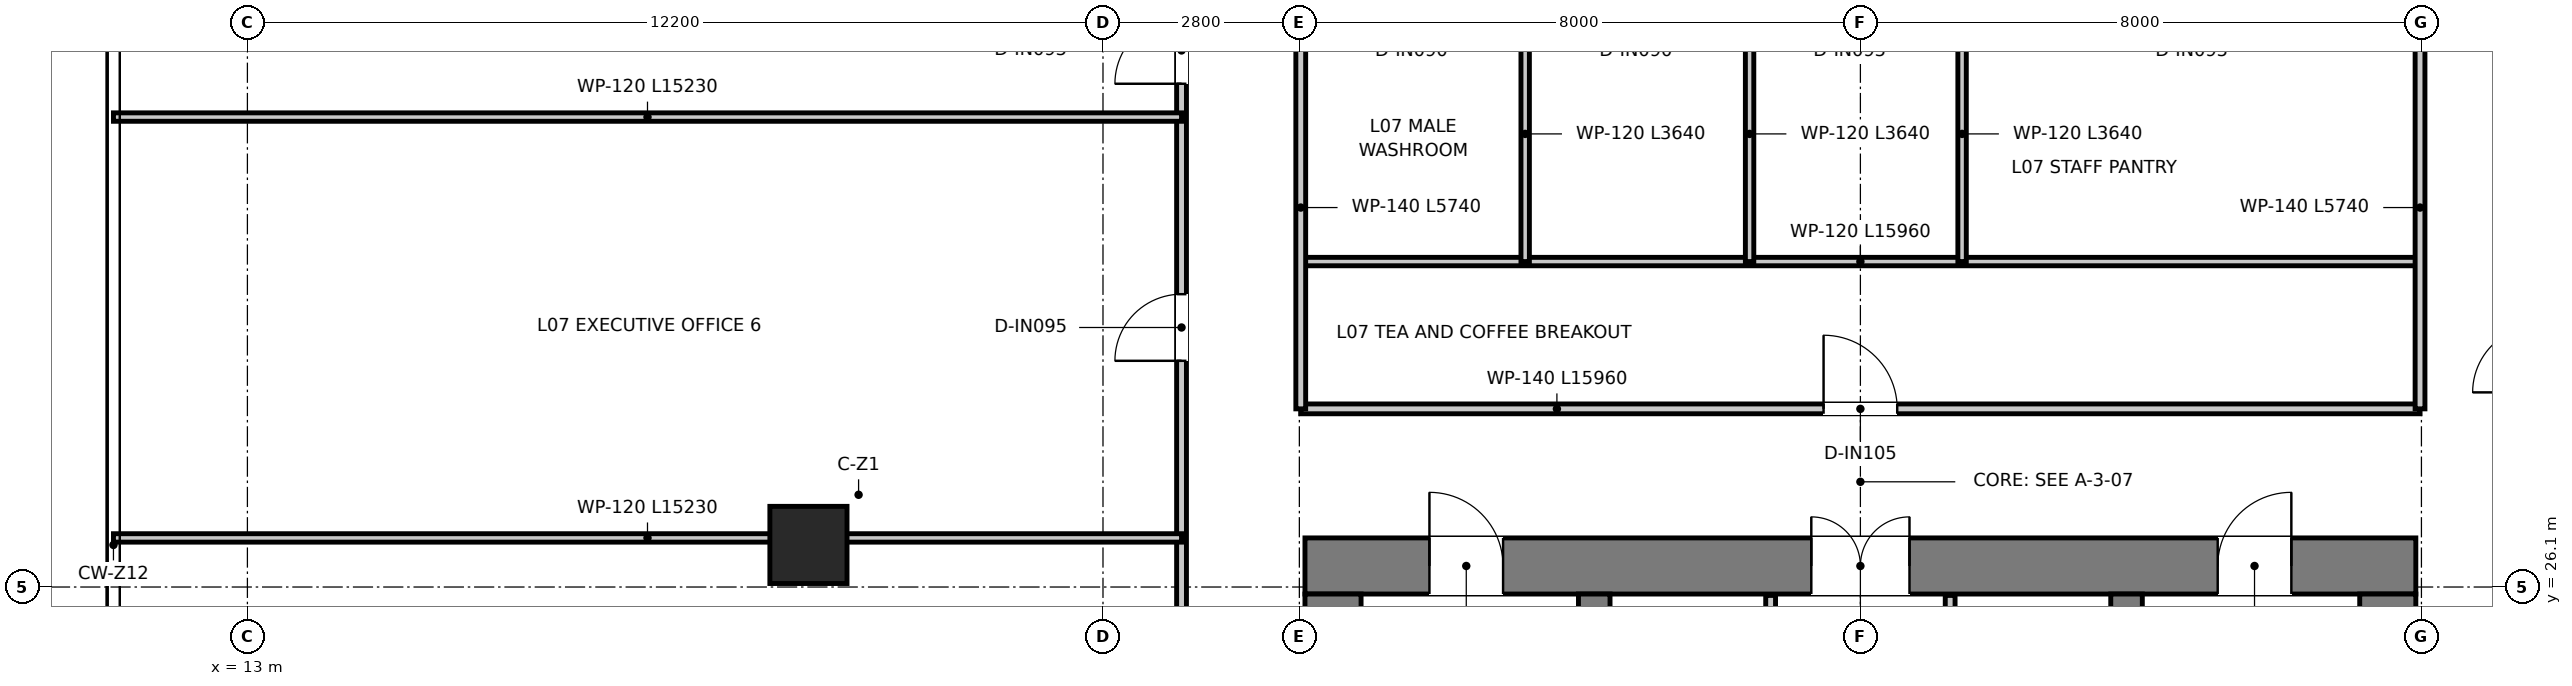
"""IFC4 building model, lengths in metres.
Left out: names, types, materials, properties, quantities, classifications, styles, units other than length and angle.
Written with IfcOpenShell. Run it as: python <this file> out.ifc"""

import sys

from ifc_helpers import new_model, si_unit, direction, frame, frame_2d, origin, origin_2d, place, context, subcontext, project, spatial, rectangle, extrude, source, transform, mapped, element, fill, save


model = new_model("IFC4")
c1 = context("Model", 3, precision=1e-05, world=origin(), true_north=direction((0.0, 1.0)))
c2 = subcontext(c1, "Body", "Model", "MODEL_VIEW")
j1 = project(units=[si_unit("LENGTHUNIT", "METRE"), si_unit("PLANEANGLEUNIT", "RADIAN")], contexts=[c1])
p1 = place(None, origin())
s1 = spatial("IfcSite", under=j1, at=p1, CompositionType="ELEMENT")
p2 = place(p1, origin())
s2 = spatial("IfcBuilding", under=s1, at=p2, CompositionType="ELEMENT")
p3 = place(p2, frame((0.0, 0.0, 32.9)))
s3 = spatial("IfcBuildingStorey", under=s2, at=p3, CompositionType="ELEMENT", Elevation=32.9)
p4 = place(p3, frame((28.08, 26.4, 0.0), z_axis=(0.0, 0.0, 1.0), x_axis=(1.0, 0.0, 0.0)))
e1 = element("IfcWall", 1, at=p4, inside=s3, PredefinedType="SHEAR", context=c2, shape_type="SweptSolid", body=[
    extrude(rectangle(XDim=15.84, YDim=0.8, at=frame_2d((7.92, 0.0))), origin(), (0.0, 0.0, 1.0), 3.95),
])
p5 = place(p4, frame((7.22, 0.0, 0.0)))
e2 = element("IfcOpeningElement", 2, at=p5, cuts=e1, PredefinedType="OPENING", context=c2, shape_type="SweptSolid", body=[
    extrude(rectangle(XDim=1.4, YDim=2.2, at=frame_2d((0.7, 1.1))), frame((0.0, 0.41, 0.0), z_axis=(0.0, -1.0, 0.0), x_axis=(1.0, 0.0, 0.0)), (0.0, 0.0, 1.0), 0.82),
])
p6 = place(p4, frame((1.775, 0.0, 0.0)))
e3 = element("IfcOpeningElement", 3, at=p6, cuts=e1, PredefinedType="OPENING", context=c2, shape_type="SweptSolid", body=[
    extrude(rectangle(XDim=1.05, YDim=2.1, at=frame_2d((0.525, 1.05))), frame((0.0, 0.41, 0.0), z_axis=(0.0, -1.0, 0.0), x_axis=(1.0, 0.0, 0.0)), (0.0, 0.0, 1.0), 0.82),
])
p7 = place(p4, frame((13.015, 0.0, 0.0)))
e4 = element("IfcOpeningElement", 4, at=p7, cuts=e1, PredefinedType="OPENING", context=c2, shape_type="SweptSolid", body=[
    extrude(rectangle(XDim=1.05, YDim=2.1, at=frame_2d((0.525, 1.05))), frame((0.0, 0.41, 0.0), z_axis=(0.0, -1.0, 0.0), x_axis=(1.0, 0.0, 0.0)), (0.0, 0.0, 1.0), 0.82),
])
for number, where, z_axis, x_axis in (
    (5, (28.48, 11.3, 0.0), (0.0, 0.0, 1.0), (0.0, 1.0, 0.0)),
    (6, (43.52, 11.3, 0.0), (0.0, 0.0, 1.0), (0.0, 1.0, 0.0)),
):
    element("IfcWall", number, at=place(p3, frame(where, z_axis=z_axis, x_axis=x_axis)), inside=s3, PredefinedType="SHEAR", context=c2, shape_type="SweptSolid", body=[
        extrude(rectangle(XDim=14.7, YDim=0.8, at=frame_2d((7.35, 0.0))), origin(), (0.0, 0.0, 1.0), 3.95),
    ])
p8 = place(p3, frame((32.205, 13.22, 0.0), z_axis=(0.0, 0.0, 1.0), x_axis=(0.0, 1.0, 0.0)))
e7 = element("IfcWall", 7, at=p8, inside=s3, PredefinedType="SHEAR", context=c2, shape_type="SweptSolid", body=[
    extrude(rectangle(XDim=12.78, YDim=0.45, at=frame_2d((6.39, 0.0))), origin(), (0.0, 0.0, 1.0), 3.95),
])
p9 = place(p8, frame((10.58, 0.0, 0.0)))
e8 = element("IfcOpeningElement", 8, at=p9, cuts=e7, PredefinedType="OPENING", context=c2, shape_type="SweptSolid", body=[
    extrude(rectangle(XDim=1.1, YDim=2.15, at=frame_2d((0.55, 1.075))), frame((0.0, 0.235, 0.0), z_axis=(0.0, -1.0, 0.0), x_axis=(1.0, 0.0, 0.0)), (0.0, 0.0, 1.0), 0.47),
])
p10 = place(p3, frame((39.795, 13.22, 0.0), z_axis=(0.0, 0.0, 1.0), x_axis=(0.0, 1.0, 0.0)))
e9 = element("IfcWall", 9, at=p10, inside=s3, PredefinedType="SHEAR", context=c2, shape_type="SweptSolid", body=[
    extrude(rectangle(XDim=12.78, YDim=0.45, at=frame_2d((6.39, 0.0))), origin(), (0.0, 0.0, 1.0), 3.95),
])
p11 = place(p10, frame((10.58, 0.0, 0.0)))
e10 = element("IfcOpeningElement", 10, at=p11, cuts=e9, PredefinedType="OPENING", context=c2, shape_type="SweptSolid", body=[
    extrude(rectangle(XDim=1.1, YDim=2.15, at=frame_2d((0.55, 1.075))), frame((0.0, 0.235, 0.0), z_axis=(0.0, -1.0, 0.0), x_axis=(1.0, 0.0, 0.0)), (0.0, 0.0, 1.0), 0.47),
])
m1 = source(origin(), c2, "Body", "SweptSolid", [
    extrude(rectangle(XDim=1.1, YDim=1.1, at=origin_2d()), origin(), (0.0, 0.0, 1.0), 3.95),
])
p12 = place(p3, frame((21.0, 26.7, 0.0), z_axis=(0.0, 0.0, 1.0), x_axis=(1.0, 0.0, 0.0)))
e11 = element("IfcColumn", 11, at=p12, inside=s3, PredefinedType="COLUMN", context=c2, shape_type="MappedRepresentation", body=[
    mapped(m1, transform((0.0, 0.0, 0.0), x_axis=(1.0, 0.0, 0.0), y_axis=(0.0, 1.0, 0.0), z_axis=(0.0, 0.0, 1.0), scale=1.0)),
])
p13 = place(p3, frame((34.72, 20.2, 0.0), z_axis=(0.0, 0.0, 1.0), x_axis=(0.0, 1.0, 0.0)))
e12 = element("IfcWall", 12, at=p13, inside=s3, PredefinedType="PARTITIONING", context=c2, shape_type="SweptSolid", body=[
    extrude(rectangle(XDim=5.78, YDim=0.14, at=frame_2d((2.89, 0.0))), origin(), (0.0, 0.0, 1.0), 2.47),
])
p14 = place(p13, frame((1.05, 0.0, 0.0)))
e13 = element("IfcOpeningElement", 13, at=p14, cuts=e12, PredefinedType="OPENING", context=c2, shape_type="SweptSolid", body=[
    extrude(rectangle(XDim=0.9, YDim=2.1, at=frame_2d((0.45, 1.05))), frame((0.0, 0.08, 0.0), z_axis=(0.0, -1.0, 0.0), x_axis=(1.0, 0.0, 0.0)), (0.0, 0.0, 1.0), 0.16),
])
p15 = place(p3, frame((37.28, 20.2, 0.0), z_axis=(0.0, 0.0, 1.0), x_axis=(0.0, 1.0, 0.0)))
e14 = element("IfcWall", 14, at=p15, inside=s3, PredefinedType="PARTITIONING", context=c2, shape_type="SweptSolid", body=[
    extrude(rectangle(XDim=5.78, YDim=0.14, at=frame_2d((2.89, 0.0))), origin(), (0.0, 0.0, 1.0), 2.47),
])
p16 = place(p15, frame((0.95, 0.0, 0.0)))
e15 = element("IfcOpeningElement", 15, at=p16, cuts=e14, PredefinedType="OPENING", context=c2, shape_type="SweptSolid", body=[
    extrude(rectangle(XDim=1.1, YDim=2.15, at=frame_2d((0.55, 1.075))), frame((0.0, 0.08, 0.0), z_axis=(0.0, -1.0, 0.0), x_axis=(1.0, 0.0, 0.0)), (0.0, 0.0, 1.0), 0.16),
])
p17 = place(p3, frame((28.02, 28.64, 0.0), z_axis=(0.0, 0.0, 1.0), x_axis=(1.0, 0.0, 0.0)))
e16 = element("IfcWall", 16, at=p17, inside=s3, PredefinedType="PARTITIONING", context=c2, shape_type="SweptSolid", body=[
    extrude(rectangle(XDim=15.96, YDim=0.14, at=frame_2d((7.98, 0.0))), origin(), (0.0, 0.0, 1.0), 3.08),
])
p18 = place(p17, frame((7.455, 0.0, 0.0)))
e17 = element("IfcOpeningElement", 17, at=p18, cuts=e16, PredefinedType="OPENING", context=c2, shape_type="SweptSolid", body=[
    extrude(rectangle(XDim=1.05, YDim=2.15, at=frame_2d((0.525, 1.075))), frame((0.0, 0.08, 0.0), z_axis=(0.0, -1.0, 0.0), x_axis=(1.0, 0.0, 0.0)), (0.0, 0.0, 1.0), 0.16),
])
p19 = place(p3, frame((28.02, 30.74, 0.0), z_axis=(0.0, 0.0, 1.0), x_axis=(1.0, 0.0, 0.0)))
e18 = element("IfcWall", 18, at=p19, inside=s3, PredefinedType="PARTITIONING", context=c2, shape_type="SweptSolid", body=[
    extrude(rectangle(XDim=15.96, YDim=0.12, at=frame_2d((7.98, 0.0))), origin(), (0.0, 0.0, 1.0), 3.08),
])
for number, where, z_axis, x_axis in (
    (19, (28.02, 28.64, 0.0), (0.0, 0.0, 1.0), (0.0, 1.0, 0.0)),
    (20, (43.98, 28.64, 0.0), (0.0, 0.0, 1.0), (0.0, 1.0, 0.0)),
):
    element("IfcWall", number, at=place(p3, frame(where, z_axis=z_axis, x_axis=x_axis)), inside=s3, PredefinedType="PARTITIONING", context=c2, shape_type="SweptSolid", body=[
        extrude(rectangle(XDim=5.74, YDim=0.14, at=frame_2d((2.87, 0.0))), origin(), (0.0, 0.0, 1.0), 3.22),
    ])
for number, where, z_axis, x_axis in (
    (21, (31.22, 30.74, 0.0), (0.0, 0.0, 1.0), (0.0, 1.0, 0.0)),
    (22, (34.42, 30.74, 0.0), (0.0, 0.0, 1.0), (0.0, 1.0, 0.0)),
    (23, (37.45, 30.74, 0.0), (0.0, 0.0, 1.0), (0.0, 1.0, 0.0)),
):
    element("IfcWall", number, at=place(p3, frame(where, z_axis=z_axis, x_axis=x_axis)), inside=s3, PredefinedType="PARTITIONING", context=c2, shape_type="SweptSolid", body=[
        extrude(rectangle(XDim=3.64, YDim=0.12, at=frame_2d((1.82, 0.0))), origin(), (0.0, 0.0, 1.0), 3.12),
    ])
p20 = place(p3, frame((26.32, 10.5, 0.0), z_axis=(0.0, 0.0, 1.0), x_axis=(0.0, 1.0, 0.0)))
e24 = element("IfcWall", 24, at=p20, inside=s3, PredefinedType="PARTITIONING", context=c2, shape_type="SweptSolid", body=[
    extrude(rectangle(XDim=25.62, YDim=0.14, at=frame_2d((12.81, 0.0))), origin(), (0.0, 0.0, 1.0), 2.97),
])
p21 = place(p20, frame((7.775, 0.0, 0.0)))
e25 = element("IfcOpeningElement", 25, at=p21, cuts=e24, PredefinedType="OPENING", context=c2, shape_type="SweptSolid", body=[
    extrude(rectangle(XDim=0.95, YDim=2.1, at=frame_2d((0.475, 1.05))), frame((0.0, 0.08, 0.0), z_axis=(0.0, -1.0, 0.0), x_axis=(1.0, 0.0, 0.0)), (0.0, 0.0, 1.0), 0.16),
])
p22 = place(p20, frame((12.425, 0.0, 0.0)))
e26 = element("IfcOpeningElement", 26, at=p22, cuts=e24, PredefinedType="OPENING", context=c2, shape_type="SweptSolid", body=[
    extrude(rectangle(XDim=0.95, YDim=2.1, at=frame_2d((0.475, 1.05))), frame((0.0, 0.08, 0.0), z_axis=(0.0, -1.0, 0.0), x_axis=(1.0, 0.0, 0.0)), (0.0, 0.0, 1.0), 0.16),
])
p23 = place(p20, frame((18.825, 0.0, 0.0)))
e27 = element("IfcOpeningElement", 27, at=p23, cuts=e24, PredefinedType="OPENING", context=c2, shape_type="SweptSolid", body=[
    extrude(rectangle(XDim=0.95, YDim=2.1, at=frame_2d((0.475, 1.05))), frame((0.0, 0.08, 0.0), z_axis=(0.0, -1.0, 0.0), x_axis=(1.0, 0.0, 0.0)), (0.0, 0.0, 1.0), 0.16),
])
p24 = place(p20, frame((22.775, 0.0, 0.0)))
e28 = element("IfcOpeningElement", 28, at=p24, cuts=e24, PredefinedType="OPENING", context=c2, shape_type="SweptSolid", body=[
    extrude(rectangle(XDim=0.95, YDim=2.1, at=frame_2d((0.475, 1.05))), frame((0.0, 0.08, 0.0), z_axis=(0.0, -1.0, 0.0), x_axis=(1.0, 0.0, 0.0)), (0.0, 0.0, 1.0), 0.16),
])
for number, where, z_axis, x_axis in (
    (29, (11.09, 26.8, 0.0), (0.0, 0.0, 1.0), (1.0, 0.0, 0.0)),
    (30, (11.09, 32.8, 0.0), (0.0, 0.0, 1.0), (1.0, 0.0, 0.0)),
):
    element("IfcWall", number, at=place(p3, frame(where, z_axis=z_axis, x_axis=x_axis)), inside=s3, PredefinedType="PARTITIONING", context=c2, shape_type="SweptSolid", body=[
        extrude(rectangle(XDim=15.23, YDim=0.12, at=frame_2d((7.615, 0.0))), origin(), (0.0, 0.0, 1.0), 2.97),
    ])
p25 = place(p5, origin())
e31 = element("IfcDoor", 31, at=p25, inside=s3, OperationType="DOUBLE_DOOR_SINGLE_SWING", PredefinedType="DOOR", context=c2, shape_type="SweptSolid", body=[
    extrude(rectangle(XDim=1.4, YDim=2.2, at=frame_2d((0.7, 1.1))), frame((0.0, 0.025, 0.0), z_axis=(0.0, -1.0, 0.0), x_axis=(1.0, 0.0, 0.0)), (0.0, 0.0, 1.0), 0.05),
])
fill(e2, e31)
p26 = place(p6, origin())
e32 = element("IfcDoor", 32, at=p26, inside=s3, OperationType="SINGLE_SWING_LEFT", PredefinedType="DOOR", context=c2, shape_type="SweptSolid", body=[
    extrude(rectangle(XDim=1.05, YDim=2.1, at=frame_2d((0.525, 1.05))), frame((0.0, 0.025, 0.0), z_axis=(0.0, -1.0, 0.0), x_axis=(1.0, 0.0, 0.0)), (0.0, 0.0, 1.0), 0.05),
])
fill(e3, e32)
p27 = place(p7, origin())
e33 = element("IfcDoor", 33, at=p27, inside=s3, OperationType="SINGLE_SWING_RIGHT", PredefinedType="DOOR", context=c2, shape_type="SweptSolid", body=[
    extrude(rectangle(XDim=1.05, YDim=2.1, at=frame_2d((0.525, 1.05))), frame((0.0, 0.025, 0.0), z_axis=(0.0, -1.0, 0.0), x_axis=(1.0, 0.0, 0.0)), (0.0, 0.0, 1.0), 0.05),
])
fill(e4, e33)
p28 = place(p18, origin())
e34 = element("IfcDoor", 34, at=p28, inside=s3, OperationType="SINGLE_SWING_LEFT", PredefinedType="DOOR", context=c2, shape_type="SweptSolid", body=[
    extrude(rectangle(XDim=1.05, YDim=2.15, at=frame_2d((0.525, 1.075))), frame((0.0, 0.025, 0.0), z_axis=(0.0, -1.0, 0.0), x_axis=(1.0, 0.0, 0.0)), (0.0, 0.0, 1.0), 0.05),
])
fill(e17, e34)
p29 = place(p23, origin())
e35 = element("IfcDoor", 35, at=p29, inside=s3, OperationType="SINGLE_SWING_LEFT", PredefinedType="DOOR", context=c2, shape_type="SweptSolid", body=[
    extrude(rectangle(XDim=0.95, YDim=2.1, at=frame_2d((0.475, 1.05))), frame((0.0, 0.025, 0.0), z_axis=(0.0, -1.0, 0.0), x_axis=(1.0, 0.0, 0.0)), (0.0, 0.0, 1.0), 0.05),
])
fill(e27, e35)
p30 = place(p24, origin())
e36 = element("IfcDoor", 36, at=p30, inside=s3, OperationType="SINGLE_SWING_LEFT", PredefinedType="DOOR", context=c2, shape_type="SweptSolid", body=[
    extrude(rectangle(XDim=0.95, YDim=2.1, at=frame_2d((0.475, 1.05))), frame((0.0, 0.025, 0.0), z_axis=(0.0, -1.0, 0.0), x_axis=(1.0, 0.0, 0.0)), (0.0, 0.0, 1.0), 0.05),
])
fill(e28, e36)
save(model, sys.argv[1])
